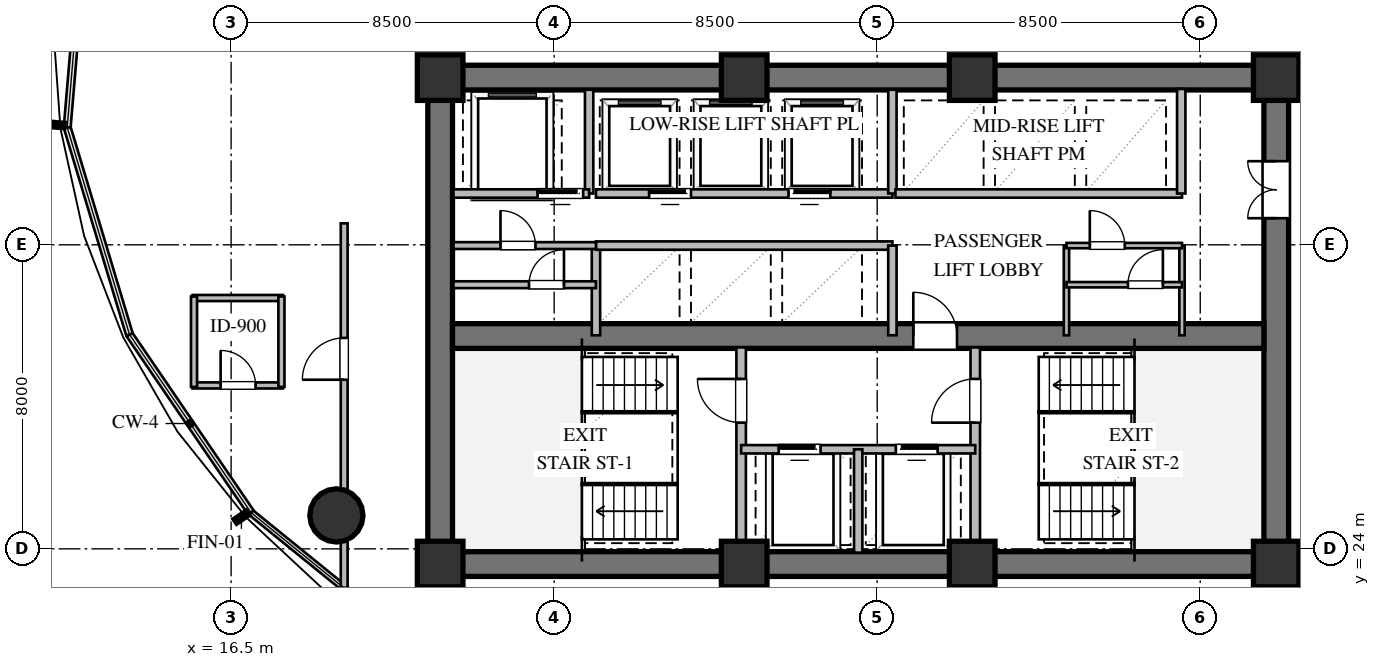
"""IFC4 building model, lengths in metres.
Left out: names, types, materials, properties, quantities, classifications, styles, units other than length and angle.
Written with IfcOpenShell. Run it as: python <this file> out.ifc"""

import sys

from ifc_helpers import new_model, si_unit, direction, frame, frame_2d, origin, origin_2d, place, context, subcontext, project, spatial, rectangle, circle, extrude, element, fill, save


model = new_model("IFC4")
c1 = context("Model", 3, precision=1e-05, world=origin(), true_north=direction((0.0, 1.0)))
c2 = subcontext(c1, "Body", "Model", "MODEL_VIEW")
j1 = project(units=[si_unit("LENGTHUNIT", "METRE"), si_unit("PLANEANGLEUNIT", "RADIAN")], contexts=[c1])
p1 = place(None, origin())
s1 = spatial("IfcSite", under=j1, at=p1, CompositionType="ELEMENT")
p2 = place(p1, origin())
s2 = spatial("IfcBuilding", under=s1, at=p2, CompositionType="ELEMENT")
p3 = place(p2, frame((0.0, 0.0, 88.8)))
s3 = spatial("IfcBuildingStorey", under=s2, at=p3, CompositionType="ELEMENT", Elevation=88.8)
for number, where, z_axis, x_axis in (
    (1, (21.675, 23.6, 0.0), (0.0, 0.0, 1.0), (1.0, 0.0, 0.0)),
    (2, (21.675, 36.4, 0.0), (0.0, 0.0, 1.0), (1.0, 0.0, 0.0)),
):
    element("IfcWall", number, at=place(p3, frame(where, z_axis=z_axis, x_axis=x_axis)), inside=s3, PredefinedType="SHEAR", context=c2, shape_type="SweptSolid", body=[
        extrude(rectangle(XDim=22.65, YDim=0.65, at=frame_2d((11.325, 0.0))), origin(), (0.0, 0.0, 1.0), 3.28),
    ])
p4 = place(p3, frame((22.0, 23.925, 0.0), z_axis=(0.0, 0.0, 1.0), x_axis=(0.0, 1.0, 0.0)))
e3 = element("IfcWall", 3, at=p4, inside=s3, PredefinedType="SHEAR", context=c2, shape_type="SweptSolid", body=[
    extrude(rectangle(XDim=12.15, YDim=0.65, at=frame_2d((6.075, 0.0))), origin(), (0.0, 0.0, 1.0), 3.28),
])
p5 = place(p3, frame((44.0, 23.925, 0.0), z_axis=(0.0, 0.0, 1.0), x_axis=(0.0, 1.0, 0.0)))
e4 = element("IfcWall", 4, at=p5, inside=s3, PredefinedType="SHEAR", context=c2, shape_type="SweptSolid", body=[
    extrude(rectangle(XDim=12.15, YDim=0.65, at=frame_2d((6.075, 0.0))), origin(), (0.0, 0.0, 1.0), 3.28),
])
p6 = place(p5, frame((8.775, 0.0, 0.0)))
e5 = element("IfcOpeningElement", 5, at=p6, cuts=e4, PredefinedType="OPENING", context=c2, shape_type="SweptSolid", body=[
    extrude(rectangle(XDim=1.5, YDim=2.15, at=frame_2d((0.75, 1.075))), frame((0.0, 0.335, 0.0), z_axis=(0.0, -1.0, 0.0), x_axis=(1.0, 0.0, 0.0)), (0.0, 0.0, 1.0), 0.67),
])
p7 = place(p3, frame((22.325, 29.6, 0.0), z_axis=(0.0, 0.0, 1.0), x_axis=(1.0, 0.0, 0.0)))
e6 = element("IfcWall", 6, at=p7, inside=s3, PredefinedType="SHEAR", context=c2, shape_type="SweptSolid", body=[
    extrude(rectangle(XDim=21.35, YDim=0.65, at=frame_2d((10.675, 0.0))), origin(), (0.0, 0.0, 1.0), 3.28),
])
p8 = place(p7, frame((12.125, 0.0, 0.0)))
e7 = element("IfcOpeningElement", 7, at=p8, cuts=e6, PredefinedType="OPENING", context=c2, shape_type="SweptSolid", body=[
    extrude(rectangle(XDim=1.15, YDim=2.1, at=frame_2d((0.575, 1.05))), frame((0.0, 0.335, 0.0), z_axis=(0.0, -1.0, 0.0), x_axis=(1.0, 0.0, 0.0)), (0.0, 0.0, 1.0), 0.67),
])
for number, where, z_axis, x_axis in (
    (8, (22.0, 23.6, 0.0), (0.0, 0.0, 1.0), (1.0, 0.0, 0.0)),
    (9, (30.0, 23.6, 0.0), (0.0, 0.0, 1.0), (1.0, 0.0, 0.0)),
    (10, (36.0, 23.6, 0.0), (0.0, 0.0, 1.0), (1.0, 0.0, 0.0)),
    (11, (44.0, 23.6, 0.0), (0.0, 0.0, 1.0), (1.0, 0.0, 0.0)),
    (12, (44.0, 36.4, 0.0), (0.0, 0.0, 1.0), (1.0, 0.0, 0.0)),
    (13, (36.0, 36.4, 0.0), (0.0, 0.0, 1.0), (1.0, 0.0, 0.0)),
    (14, (30.0, 36.4, 0.0), (0.0, 0.0, 1.0), (1.0, 0.0, 0.0)),
    (15, (22.0, 36.4, 0.0), (0.0, 0.0, 1.0), (1.0, 0.0, 0.0)),
):
    element("IfcColumn", number, at=place(p3, frame(where, z_axis=z_axis, x_axis=x_axis)), inside=s3, PredefinedType="COLUMN", context=c2, shape_type="SweptSolid", body=[
        extrude(rectangle(XDim=1.2, YDim=1.2, at=origin_2d()), origin(), (0.0, 0.0, 1.0), 3.6),
    ])
p9 = place(p3, frame((19.27, 24.88, 0.0), z_axis=(0.0, 0.0, 1.0), x_axis=(1.0, 0.0, 0.0)))
e16 = element("IfcColumn", 16, at=p9, inside=s3, PredefinedType="COLUMN", context=c2, shape_type="SweptSolid", body=[
    extrude(circle(Radius=0.7, at=origin_2d()), origin(), (0.0, 0.0, 1.0), 3.6),
])
p10 = place(p3, frame((29.92, 23.9, 0.0), z_axis=(0.0, 0.0, 1.0), x_axis=(0.0, 1.0, 0.0)))
e17 = element("IfcWall", 17, at=p10, inside=s3, PredefinedType="SOLIDWALL", context=c2, shape_type="SweptSolid", body=[
    extrude(rectangle(XDim=5.4, YDim=0.25, at=frame_2d((2.7, 0.0))), origin(), (0.0, 0.0, 1.0), 3.28),
])
p11 = place(p10, frame((3.421, 0.0, 0.0)))
e18 = element("IfcOpeningElement", 18, at=p11, cuts=e17, PredefinedType="OPENING", context=c2, shape_type="SweptSolid", body=[
    extrude(rectangle(XDim=1.15, YDim=2.1, at=frame_2d((0.575, 1.05))), frame((0.0, 0.135, 0.0), z_axis=(0.0, -1.0, 0.0), x_axis=(1.0, 0.0, 0.0)), (0.0, 0.0, 1.0), 0.27),
])
p12 = place(p3, frame((36.08, 23.9, 0.0), z_axis=(0.0, 0.0, 1.0), x_axis=(0.0, 1.0, 0.0)))
e19 = element("IfcWall", 19, at=p12, inside=s3, PredefinedType="SOLIDWALL", context=c2, shape_type="SweptSolid", body=[
    extrude(rectangle(XDim=5.4, YDim=0.25, at=frame_2d((2.7, 0.0))), origin(), (0.0, 0.0, 1.0), 3.28),
])
p13 = place(p12, frame((3.421, 0.0, 0.0)))
e20 = element("IfcOpeningElement", 20, at=p13, cuts=e19, PredefinedType="OPENING", context=c2, shape_type="SweptSolid", body=[
    extrude(rectangle(XDim=1.15, YDim=2.1, at=frame_2d((0.575, 1.05))), frame((0.0, 0.135, 0.0), z_axis=(0.0, -1.0, 0.0), x_axis=(1.0, 0.0, 0.0)), (0.0, 0.0, 1.0), 0.27),
])
p14 = place(p3, frame((29.92, 26.62, 0.0), z_axis=(0.0, 0.0, 1.0), x_axis=(1.0, 0.0, 0.0)))
e21 = element("IfcWall", 21, at=p14, inside=s3, PredefinedType="SOLIDWALL", context=c2, shape_type="SweptSolid", body=[
    extrude(rectangle(XDim=6.16, YDim=0.22, at=frame_2d((3.08, 0.0))), origin(), (0.0, 0.0, 1.0), 3.28),
])
p15 = place(p14, frame((0.99, 0.0, 0.0)))
e22 = element("IfcOpeningElement", 22, at=p15, cuts=e21, PredefinedType="OPENING", context=c2, shape_type="SweptSolid", body=[
    extrude(rectangle(XDim=1.1, YDim=2.1, at=frame_2d((0.55, 1.05))), frame((0.0, 0.12, 0.0), z_axis=(0.0, -1.0, 0.0), x_axis=(1.0, 0.0, 0.0)), (0.0, 0.0, 1.0), 0.24),
])
p16 = place(p14, frame((4.07, 0.0, 0.0)))
e23 = element("IfcOpeningElement", 23, at=p16, cuts=e21, PredefinedType="OPENING", context=c2, shape_type="SweptSolid", body=[
    extrude(rectangle(XDim=1.1, YDim=2.1, at=frame_2d((0.55, 1.05))), frame((0.0, 0.12, 0.0), z_axis=(0.0, -1.0, 0.0), x_axis=(1.0, 0.0, 0.0)), (0.0, 0.0, 1.0), 0.24),
])
p17 = place(p3, frame((33.0, 23.9, 0.0), z_axis=(0.0, 0.0, 1.0), x_axis=(0.0, 1.0, 0.0)))
e24 = element("IfcWall", 24, at=p17, inside=s3, PredefinedType="SOLIDWALL", context=c2, shape_type="SweptSolid", body=[
    extrude(rectangle(XDim=2.72, YDim=0.22, at=frame_2d((1.36, 0.0))), origin(), (0.0, 0.0, 1.0), 3.28),
])
p18 = place(p3, frame((25.92, 33.35, 0.0), z_axis=(0.0, 0.0, 1.0), x_axis=(0.0, 1.0, 0.0)))
e25 = element("IfcWall", 25, at=p18, inside=s3, PredefinedType="SOLIDWALL", context=c2, shape_type="SweptSolid", body=[
    extrude(rectangle(XDim=2.73, YDim=0.22, at=frame_2d((1.365, 0.0))), origin(), (0.0, 0.0, 1.0), 3.28),
])
p19 = place(p3, frame((22.35, 33.35, 0.0), z_axis=(0.0, 0.0, 1.0), x_axis=(1.0, 0.0, 0.0)))
e26 = element("IfcWall", 26, at=p19, inside=s3, PredefinedType="SOLIDWALL", context=c2, shape_type="SweptSolid", body=[
    extrude(rectangle(XDim=3.57, YDim=0.22, at=frame_2d((1.785, 0.0))), origin(), (0.0, 0.0, 1.0), 3.28),
])
p20 = place(p19, frame((2.213, 0.0, 0.0)))
e27 = element("IfcOpeningElement", 27, at=p20, cuts=e26, PredefinedType="OPENING", context=c2, shape_type="SweptSolid", body=[
    extrude(rectangle(XDim=1.2, YDim=2.1, at=frame_2d((0.6, 1.05))), frame((0.0, 0.12, 0.0), z_axis=(0.0, -1.0, 0.0), x_axis=(1.0, 0.0, 0.0)), (0.0, 0.0, 1.0), 0.24),
])
p21 = place(p3, frame((26.1, 29.62, 0.0), z_axis=(0.0, 0.0, 1.0), x_axis=(0.0, 1.0, 0.0)))
e28 = element("IfcWall", 28, at=p21, inside=s3, PredefinedType="SOLIDWALL", context=c2, shape_type="SweptSolid", body=[
    extrude(rectangle(XDim=2.36, YDim=0.22, at=frame_2d((1.18, 0.0))), origin(), (0.0, 0.0, 1.0), 3.28),
])
p22 = place(p3, frame((26.1, 31.98, 0.0), z_axis=(0.0, 0.0, 1.0), x_axis=(1.0, 0.0, 0.0)))
e29 = element("IfcWall", 29, at=p22, inside=s3, PredefinedType="SOLIDWALL", context=c2, shape_type="SweptSolid", body=[
    extrude(rectangle(XDim=7.8, YDim=0.22, at=frame_2d((3.9, 0.0))), origin(), (0.0, 0.0, 1.0), 3.28),
])
p23 = place(p3, frame((33.9, 29.62, 0.0), z_axis=(0.0, 0.0, 1.0), x_axis=(0.0, 1.0, 0.0)))
e30 = element("IfcWall", 30, at=p23, inside=s3, PredefinedType="SOLIDWALL", context=c2, shape_type="SweptSolid", body=[
    extrude(rectangle(XDim=2.36, YDim=0.22, at=frame_2d((1.18, 0.0))), origin(), (0.0, 0.0, 1.0), 3.28),
])
p24 = place(p3, frame((26.1, 33.35, 0.0), z_axis=(0.0, 0.0, 1.0), x_axis=(1.0, 0.0, 0.0)))
e31 = element("IfcWall", 31, at=p24, inside=s3, PredefinedType="SOLIDWALL", context=c2, shape_type="SweptSolid", body=[
    extrude(rectangle(XDim=7.8, YDim=0.22, at=frame_2d((3.9, 0.0))), origin(), (0.0, 0.0, 1.0), 3.28),
])
p25 = place(p24, frame((1.4, 0.0, 0.0)))
e32 = element("IfcOpeningElement", 32, at=p25, cuts=e31, PredefinedType="OPENING", context=c2, shape_type="SweptSolid", body=[
    extrude(rectangle(XDim=1.1, YDim=2.1, at=frame_2d((0.55, 1.05))), frame((0.0, 0.12, 0.0), z_axis=(0.0, -1.0, 0.0), x_axis=(1.0, 0.0, 0.0)), (0.0, 0.0, 1.0), 0.24),
])
p26 = place(p24, frame((5.066, 0.0, 0.0)))
e33 = element("IfcOpeningElement", 33, at=p26, cuts=e31, PredefinedType="OPENING", context=c2, shape_type="SweptSolid", body=[
    extrude(rectangle(XDim=1.1, YDim=2.1, at=frame_2d((0.55, 1.05))), frame((0.0, 0.12, 0.0), z_axis=(0.0, -1.0, 0.0), x_axis=(1.0, 0.0, 0.0)), (0.0, 0.0, 1.0), 0.24),
])
p27 = place(p3, frame((33.9, 33.35, 0.0), z_axis=(0.0, 0.0, 1.0), x_axis=(0.0, 1.0, 0.0)))
e34 = element("IfcWall", 34, at=p27, inside=s3, PredefinedType="SOLIDWALL", context=c2, shape_type="SweptSolid", body=[
    extrude(rectangle(XDim=2.73, YDim=0.22, at=frame_2d((1.365, 0.0))), origin(), (0.0, 0.0, 1.0), 3.28),
])
p28 = place(p3, frame((33.98, 33.35, 0.0), z_axis=(0.0, 0.0, 1.0), x_axis=(1.0, 0.0, 0.0)))
e35 = element("IfcWall", 35, at=p28, inside=s3, PredefinedType="SOLIDWALL", context=c2, shape_type="SweptSolid", body=[
    extrude(rectangle(XDim=7.54, YDim=0.22, at=frame_2d((3.77, 0.0))), origin(), (0.0, 0.0, 1.0), 3.28),
])
p29 = place(p3, frame((41.5, 33.35, 0.0), z_axis=(0.0, 0.0, 1.0), x_axis=(0.0, 1.0, 0.0)))
e36 = element("IfcWall", 36, at=p29, inside=s3, PredefinedType="SOLIDWALL", context=c2, shape_type="SweptSolid", body=[
    extrude(rectangle(XDim=2.75, YDim=0.22, at=frame_2d((1.375, 0.0))), origin(), (0.0, 0.0, 1.0), 3.28),
])
p30 = place(p3, frame((22.35, 30.95, 0.0), z_axis=(0.0, 0.0, 1.0), x_axis=(1.0, 0.0, 0.0)))
e37 = element("IfcWall", 37, at=p30, inside=s3, PredefinedType="PARTITIONING", context=c2, shape_type="SweptSolid", body=[
    extrude(rectangle(XDim=3.75, YDim=0.18, at=frame_2d((1.875, 0.0))), origin(), (0.0, 0.0, 1.0), 3.28),
])
p31 = place(p30, frame((1.988, 0.0, 0.0)))
e38 = element("IfcOpeningElement", 38, at=p31, cuts=e37, PredefinedType="OPENING", context=c2, shape_type="SweptSolid", body=[
    extrude(rectangle(XDim=0.92, YDim=2.1, at=frame_2d((0.46, 1.05))), frame((0.0, 0.1, 0.0), z_axis=(0.0, -1.0, 0.0), x_axis=(1.0, 0.0, 0.0)), (0.0, 0.0, 1.0), 0.2),
])
p32 = place(p3, frame((22.35, 31.98, 0.0), z_axis=(0.0, 0.0, 1.0), x_axis=(1.0, 0.0, 0.0)))
e39 = element("IfcWall", 39, at=p32, inside=s3, PredefinedType="PARTITIONING", context=c2, shape_type="SweptSolid", body=[
    extrude(rectangle(XDim=3.75, YDim=0.18, at=frame_2d((1.875, 0.0))), origin(), (0.0, 0.0, 1.0), 3.28),
])
p33 = place(p32, frame((1.238, 0.0, 0.0)))
e40 = element("IfcOpeningElement", 40, at=p33, cuts=e39, PredefinedType="OPENING", context=c2, shape_type="SweptSolid", body=[
    extrude(rectangle(XDim=0.92, YDim=2.1, at=frame_2d((0.46, 1.05))), frame((0.0, 0.1, 0.0), z_axis=(0.0, -1.0, 0.0), x_axis=(1.0, 0.0, 0.0)), (0.0, 0.0, 1.0), 0.2),
])
for number, where, z_axis, x_axis in (
    (41, (38.48, 29.62, 0.0), (0.0, 0.0, 1.0), (0.0, 1.0, 0.0)),
    (42, (41.52, 29.62, 0.0), (0.0, 0.0, 1.0), (0.0, 1.0, 0.0)),
):
    element("IfcWall", number, at=place(p3, frame(where, z_axis=z_axis, x_axis=x_axis)), inside=s3, PredefinedType="PARTITIONING", context=c2, shape_type="SweptSolid", body=[
        extrude(rectangle(XDim=2.36, YDim=0.14, at=frame_2d((1.18, 0.0))), origin(), (0.0, 0.0, 1.0), 3.28),
    ])
p34 = place(p3, frame((38.48, 30.95, 0.0), z_axis=(0.0, 0.0, 1.0), x_axis=(1.0, 0.0, 0.0)))
e43 = element("IfcWall", 43, at=p34, inside=s3, PredefinedType="PARTITIONING", context=c2, shape_type="SweptSolid", body=[
    extrude(rectangle(XDim=3.04, YDim=0.14, at=frame_2d((1.52, 0.0))), origin(), (0.0, 0.0, 1.0), 3.28),
])
p35 = place(p34, frame((1.617, 0.0, 0.0)))
e44 = element("IfcOpeningElement", 44, at=p35, cuts=e43, PredefinedType="OPENING", context=c2, shape_type="SweptSolid", body=[
    extrude(rectangle(XDim=0.92, YDim=2.1, at=frame_2d((0.46, 1.05))), frame((0.0, 0.08, 0.0), z_axis=(0.0, -1.0, 0.0), x_axis=(1.0, 0.0, 0.0)), (0.0, 0.0, 1.0), 0.16),
])
p36 = place(p3, frame((38.48, 31.98, 0.0), z_axis=(0.0, 0.0, 1.0), x_axis=(1.0, 0.0, 0.0)))
e45 = element("IfcWall", 45, at=p36, inside=s3, PredefinedType="PARTITIONING", context=c2, shape_type="SweptSolid", body=[
    extrude(rectangle(XDim=3.04, YDim=0.14, at=frame_2d((1.52, 0.0))), origin(), (0.0, 0.0, 1.0), 3.28),
])
p37 = place(p36, frame((0.614, 0.0, 0.0)))
e46 = element("IfcOpeningElement", 46, at=p37, cuts=e45, PredefinedType="OPENING", context=c2, shape_type="SweptSolid", body=[
    extrude(rectangle(XDim=0.92, YDim=2.1, at=frame_2d((0.46, 1.05))), frame((0.0, 0.08, 0.0), z_axis=(0.0, -1.0, 0.0), x_axis=(1.0, 0.0, 0.0)), (0.0, 0.0, 1.0), 0.16),
])
p38 = place(p3, frame((15.484, 28.3, 0.0), z_axis=(0.0, 0.0, 1.0), x_axis=(1.0, 0.0, 0.0)))
e47 = element("IfcWall", 47, at=p38, inside=s3, PredefinedType="PLUMBINGWALL", context=c2, shape_type="SweptSolid", body=[
    extrude(rectangle(XDim=2.38, YDim=0.16, at=frame_2d((1.19, 0.0))), origin(), (0.0, 0.0, 1.0), 3.28),
])
p39 = place(p38, frame((0.74, 0.0, 0.0)))
e48 = element("IfcOpeningElement", 48, at=p39, cuts=e47, PredefinedType="OPENING", context=c2, shape_type="SweptSolid", body=[
    extrude(rectangle(XDim=0.92, YDim=2.1, at=frame_2d((0.46, 1.05))), frame((0.0, 0.09, 0.0), z_axis=(0.0, -1.0, 0.0), x_axis=(1.0, 0.0, 0.0)), (0.0, 0.0, 1.0), 0.18),
])
p40 = place(p3, frame((15.484, 30.6, 0.0), z_axis=(0.0, 0.0, 1.0), x_axis=(1.0, 0.0, 0.0)))
e49 = element("IfcWall", 49, at=p40, inside=s3, PredefinedType="PLUMBINGWALL", context=c2, shape_type="SweptSolid", body=[
    extrude(rectangle(XDim=2.38, YDim=0.16, at=frame_2d((1.19, 0.0))), origin(), (0.0, 0.0, 1.0), 3.28),
])
p41 = place(p3, frame((15.524, 28.26, 0.0), z_axis=(0.0, 0.0, 1.0), x_axis=(0.0, 1.0, 0.0)))
e50 = element("IfcWall", 50, at=p41, inside=s3, PredefinedType="PLUMBINGWALL", context=c2, shape_type="SweptSolid", body=[
    extrude(rectangle(XDim=2.38, YDim=0.16, at=frame_2d((1.19, 0.0))), origin(), (0.0, 0.0, 1.0), 3.28),
])
p42 = place(p3, frame((17.824, 28.26, 0.0), z_axis=(0.0, 0.0, 1.0), x_axis=(0.0, 1.0, 0.0)))
e51 = element("IfcWall", 51, at=p42, inside=s3, PredefinedType="PLUMBINGWALL", context=c2, shape_type="SweptSolid", body=[
    extrude(rectangle(XDim=2.38, YDim=0.16, at=frame_2d((1.19, 0.0))), origin(), (0.0, 0.0, 1.0), 2.577),
])
p43 = place(p3, frame((19.475, 22.976, 0.0), z_axis=(0.0, 0.0, 1.0), x_axis=(0.0, 1.0, 0.0)))
e52 = element("IfcWall", 52, at=p43, inside=s3, PredefinedType="PARTITIONING", context=c2, shape_type="SweptSolid", body=[
    extrude(rectangle(XDim=9.589, YDim=0.18, at=frame_2d((4.794, 0.0))), origin(), (0.0, 0.0, 1.0), 2.577),
])
p44 = place(p43, frame((5.474, 0.0, 0.0)))
e53 = element("IfcOpeningElement", 53, at=p44, cuts=e52, PredefinedType="OPENING", context=c2, shape_type="SweptSolid", body=[
    extrude(rectangle(XDim=1.1, YDim=2.1, at=frame_2d((0.55, 1.05))), frame((0.0, 0.1, 0.0), z_axis=(0.0, -1.0, 0.0), x_axis=(1.0, 0.0, 0.0)), (0.0, 0.0, 1.0), 0.2),
])
p45 = place(p11, origin())
e54 = element("IfcDoor", 54, at=p45, inside=s3, OperationType="SINGLE_SWING_RIGHT", PredefinedType="DOOR", context=c2, shape_type="SweptSolid", body=[
    extrude(rectangle(XDim=1.15, YDim=2.1, at=frame_2d((0.575, 1.05))), frame((0.0, 0.025, 0.0), z_axis=(0.0, -1.0, 0.0), x_axis=(1.0, 0.0, 0.0)), (0.0, 0.0, 1.0), 0.05),
])
fill(e18, e54)
p46 = place(p13, origin())
e55 = element("IfcDoor", 55, at=p46, inside=s3, OperationType="SINGLE_SWING_LEFT", PredefinedType="DOOR", context=c2, shape_type="SweptSolid", body=[
    extrude(rectangle(XDim=1.15, YDim=2.1, at=frame_2d((0.575, 1.05))), frame((0.0, 0.025, 0.0), z_axis=(0.0, -1.0, 0.0), x_axis=(1.0, 0.0, 0.0)), (0.0, 0.0, 1.0), 0.05),
])
fill(e20, e55)
p47 = place(p15, origin())
e56 = element("IfcDoor", 56, at=p47, inside=s3, OperationType="SLIDING_TO_LEFT", PredefinedType="DOOR", context=c2, shape_type="SweptSolid", body=[
    extrude(rectangle(XDim=1.1, YDim=2.1, at=frame_2d((0.55, 1.05))), frame((0.0, 0.025, 0.0), z_axis=(0.0, -1.0, 0.0), x_axis=(1.0, 0.0, 0.0)), (0.0, 0.0, 1.0), 0.05),
])
fill(e22, e56)
p48 = place(p16, origin())
e57 = element("IfcDoor", 57, at=p48, inside=s3, OperationType="SLIDING_TO_RIGHT", PredefinedType="DOOR", context=c2, shape_type="SweptSolid", body=[
    extrude(rectangle(XDim=1.1, YDim=2.1, at=frame_2d((0.55, 1.05))), frame((0.0, 0.025, 0.0), z_axis=(0.0, -1.0, 0.0), x_axis=(1.0, 0.0, 0.0)), (0.0, 0.0, 1.0), 0.05),
])
fill(e23, e57)
p49 = place(p8, origin())
e58 = element("IfcDoor", 58, at=p49, inside=s3, OperationType="SINGLE_SWING_LEFT", PredefinedType="DOOR", context=c2, shape_type="SweptSolid", body=[
    extrude(rectangle(XDim=1.15, YDim=2.1, at=frame_2d((0.575, 1.05))), frame((0.0, 0.025, 0.0), z_axis=(0.0, -1.0, 0.0), x_axis=(1.0, 0.0, 0.0)), (0.0, 0.0, 1.0), 0.05),
])
fill(e7, e58)
p50 = place(p6, origin())
e59 = element("IfcDoor", 59, at=p50, inside=s3, OperationType="DOUBLE_DOOR_SINGLE_SWING", PredefinedType="DOOR", context=c2, shape_type="SweptSolid", body=[
    extrude(rectangle(XDim=1.5, YDim=2.15, at=frame_2d((0.75, 1.075))), frame((0.0, 0.025, 0.0), z_axis=(0.0, -1.0, 0.0), x_axis=(1.0, 0.0, 0.0)), (0.0, 0.0, 1.0), 0.05),
])
fill(e5, e59)
p51 = place(p20, origin())
e60 = element("IfcDoor", 60, at=p51, inside=s3, OperationType="SLIDING_TO_LEFT", PredefinedType="DOOR", context=c2, shape_type="SweptSolid", body=[
    extrude(rectangle(XDim=1.2, YDim=2.1, at=frame_2d((0.6, 1.05))), frame((0.0, 0.025, 0.0), z_axis=(0.0, -1.0, 0.0), x_axis=(1.0, 0.0, 0.0)), (0.0, 0.0, 1.0), 0.05),
])
fill(e27, e60)
p52 = place(p25, origin())
e61 = element("IfcDoor", 61, at=p52, inside=s3, OperationType="SLIDING_TO_LEFT", PredefinedType="DOOR", context=c2, shape_type="SweptSolid", body=[
    extrude(rectangle(XDim=1.1, YDim=2.1, at=frame_2d((0.55, 1.05))), frame((0.0, 0.025, 0.0), z_axis=(0.0, -1.0, 0.0), x_axis=(1.0, 0.0, 0.0)), (0.0, 0.0, 1.0), 0.05),
])
fill(e32, e61)
p53 = place(p26, origin())
e62 = element("IfcDoor", 62, at=p53, inside=s3, OperationType="SLIDING_TO_RIGHT", PredefinedType="DOOR", context=c2, shape_type="SweptSolid", body=[
    extrude(rectangle(XDim=1.1, YDim=2.1, at=frame_2d((0.55, 1.05))), frame((0.0, 0.025, 0.0), z_axis=(0.0, -1.0, 0.0), x_axis=(1.0, 0.0, 0.0)), (0.0, 0.0, 1.0), 0.05),
])
fill(e33, e62)
p54 = place(p33, origin())
e63 = element("IfcDoor", 63, at=p54, inside=s3, OperationType="SINGLE_SWING_LEFT", PredefinedType="DOOR", context=c2, shape_type="SweptSolid", body=[
    extrude(rectangle(XDim=0.92, YDim=2.1, at=frame_2d((0.46, 1.05))), frame((0.0, 0.025, 0.0), z_axis=(0.0, -1.0, 0.0), x_axis=(1.0, 0.0, 0.0)), (0.0, 0.0, 1.0), 0.05),
])
fill(e40, e63)
p55 = place(p31, origin())
e64 = element("IfcDoor", 64, at=p55, inside=s3, OperationType="SINGLE_SWING_RIGHT", PredefinedType="DOOR", context=c2, shape_type="SweptSolid", body=[
    extrude(rectangle(XDim=0.92, YDim=2.1, at=frame_2d((0.46, 1.05))), frame((0.0, 0.025, 0.0), z_axis=(0.0, -1.0, 0.0), x_axis=(1.0, 0.0, 0.0)), (0.0, 0.0, 1.0), 0.05),
])
fill(e38, e64)
p56 = place(p37, origin())
e65 = element("IfcDoor", 65, at=p56, inside=s3, OperationType="SINGLE_SWING_LEFT", PredefinedType="DOOR", context=c2, shape_type="SweptSolid", body=[
    extrude(rectangle(XDim=0.92, YDim=2.1, at=frame_2d((0.46, 1.05))), frame((0.0, 0.025, 0.0), z_axis=(0.0, -1.0, 0.0), x_axis=(1.0, 0.0, 0.0)), (0.0, 0.0, 1.0), 0.05),
])
fill(e46, e65)
p57 = place(p35, origin())
e66 = element("IfcDoor", 66, at=p57, inside=s3, OperationType="SINGLE_SWING_RIGHT", PredefinedType="DOOR", context=c2, shape_type="SweptSolid", body=[
    extrude(rectangle(XDim=0.92, YDim=2.1, at=frame_2d((0.46, 1.05))), frame((0.0, 0.025, 0.0), z_axis=(0.0, -1.0, 0.0), x_axis=(1.0, 0.0, 0.0)), (0.0, 0.0, 1.0), 0.05),
])
fill(e44, e66)
p58 = place(p39, origin())
e67 = element("IfcDoor", 67, at=p58, inside=s3, OperationType="SINGLE_SWING_LEFT", PredefinedType="DOOR", context=c2, shape_type="SweptSolid", body=[
    extrude(rectangle(XDim=0.92, YDim=2.1, at=frame_2d((0.46, 1.05))), frame((0.0, 0.025, 0.0), z_axis=(0.0, -1.0, 0.0), x_axis=(1.0, 0.0, 0.0)), (0.0, 0.0, 1.0), 0.05),
])
fill(e48, e67)
p59 = place(p44, origin())
e68 = element("IfcDoor", 68, at=p59, inside=s3, OperationType="SINGLE_SWING_LEFT", PredefinedType="DOOR", context=c2, shape_type="SweptSolid", body=[
    extrude(rectangle(XDim=1.1, YDim=2.1, at=frame_2d((0.55, 1.05))), frame((0.0, 0.025, 0.0), z_axis=(0.0, -1.0, 0.0), x_axis=(1.0, 0.0, 0.0)), (0.0, 0.0, 1.0), 0.05),
])
fill(e53, e68)
save(model, sys.argv[1])
